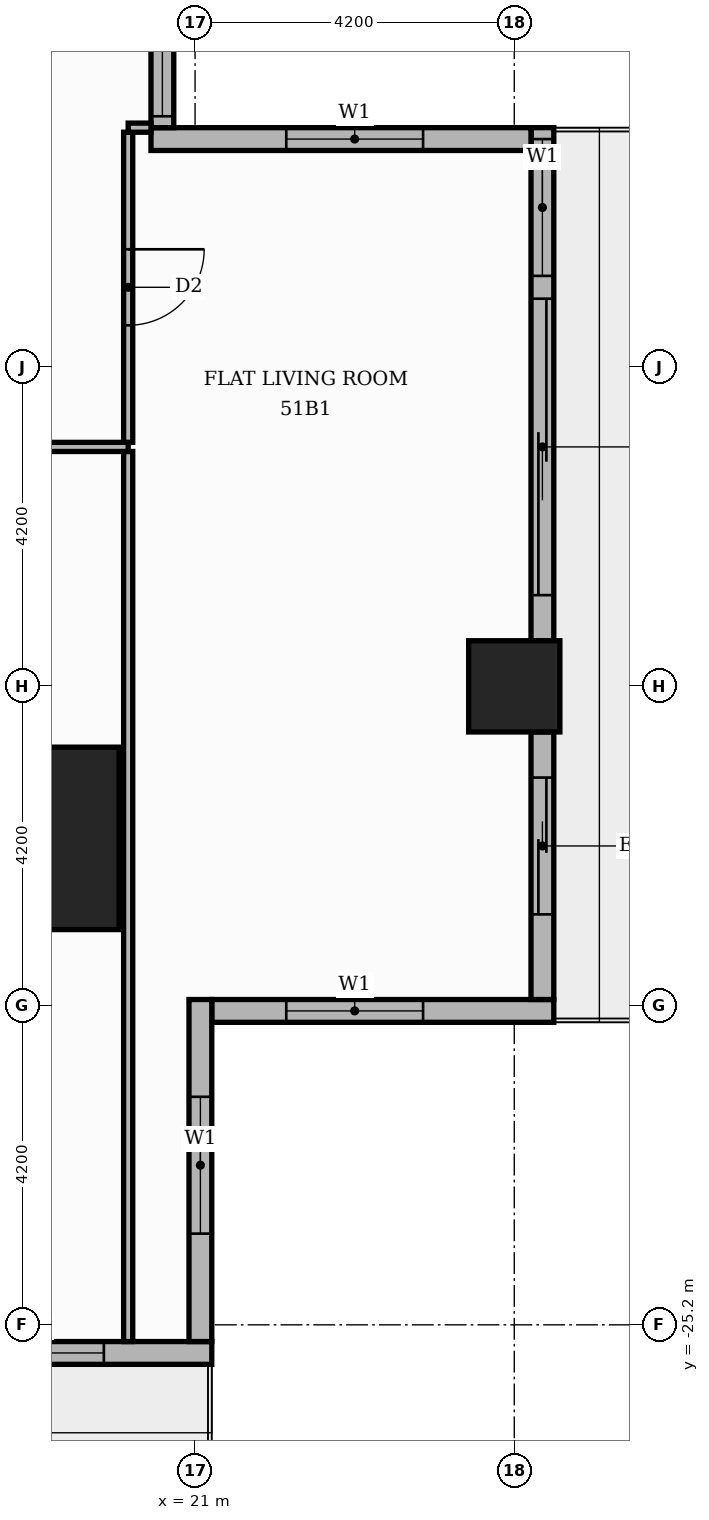
"""IFC4 building model, lengths in metres.
Left out: names, types, materials, properties, quantities, classifications, styles, units other than length and angle.
Written with IfcOpenShell. Run it as: python <this file> out.ifc"""

import sys

from ifc_helpers import new_model, si_unit, direction, frame, frame_2d, origin, origin_2d, place, context, subcontext, project, spatial, rectangle, extrude, element, fill, save


model = new_model("IFC4")
c1 = context("Model", 3, precision=1e-05, world=origin(), true_north=direction((0.0, 1.0)))
c2 = subcontext(c1, "Body", "Model", "MODEL_VIEW")
j1 = project(units=[si_unit("LENGTHUNIT", "METRE"), si_unit("PLANEANGLEUNIT", "RADIAN")], contexts=[c1])
p1 = place(None, origin())
s1 = spatial("IfcSite", under=j1, at=p1, CompositionType="ELEMENT")
p2 = place(p1, origin())
s2 = spatial("IfcBuilding", under=s1, at=p2, CompositionType="ELEMENT")
p3 = place(p2, frame((0.0, 0.0, 215.7)))
s3 = spatial("IfcBuildingStorey", under=s2, at=p3, CompositionType="ELEMENT", Elevation=215.7)
p4 = place(p3, frame((18.8, -18.8, 0.0), z_axis=(0.0, 0.0, 1.0), x_axis=(1.0, 0.0, 0.0)))
e1 = element("IfcColumn", 1, at=p4, inside=s3, PredefinedType="COLUMN", context=c2, shape_type="SweptSolid", body=[
    extrude(rectangle(XDim=2.4, YDim=2.4, at=origin_2d()), origin(), (0.0, 0.0, 1.0), 3.9),
])
p5 = place(p3, frame((25.2, -16.8, 0.0), z_axis=(0.0, 0.0, 1.0), x_axis=(1.0, 0.0, 0.0)))
e2 = element("IfcColumn", 2, at=p5, inside=s3, PredefinedType="COLUMN", context=c2, shape_type="SweptSolid", body=[
    extrude(rectangle(XDim=1.2, YDim=1.2, at=origin_2d()), origin(), (0.0, 0.0, 1.0), 3.9),
])
p6 = place(p3, frame((21.22, -21.07, 0.0), z_axis=(0.0, 0.0, 1.0), x_axis=(1.0, 0.0, 0.0)))
e3 = element("IfcWall", 3, at=p6, inside=s3, PredefinedType="STANDARD", context=c2, shape_type="SweptSolid", body=[
    extrude(rectangle(XDim=4.5, YDim=0.3, at=frame_2d((2.25, 0.0))), origin(), (0.0, 0.0, 1.0), 3.48),
])
p7 = place(p6, frame((0.98, 0.0, 0.9)))
e4 = element("IfcOpeningElement", 4, at=p7, cuts=e3, PredefinedType="OPENING", context=c2, shape_type="SweptSolid", body=[
    extrude(rectangle(XDim=1.8, YDim=2.1, at=frame_2d((0.9, 1.05))), frame((0.0, 0.16, 0.0), z_axis=(0.0, -1.0, 0.0), x_axis=(1.0, 0.0, 0.0)), (0.0, 0.0, 1.0), 0.32),
])
p8 = place(p3, frame((25.57, -20.92, 0.0), z_axis=(0.0, 0.0, 1.0), x_axis=(0.0, 1.0, 0.0)))
e5 = element("IfcWall", 5, at=p8, inside=s3, PredefinedType="STANDARD", context=c2, shape_type="SweptSolid", body=[
    extrude(rectangle(XDim=3.52, YDim=0.3, at=frame_2d((1.76, 0.0))), origin(), (0.0, 0.0, 1.0), 3.48),
])
p9 = place(p8, frame((1.12, 0.0, 0.0)))
e6 = element("IfcOpeningElement", 6, at=p9, cuts=e5, PredefinedType="OPENING", context=c2, shape_type="SweptSolid", body=[
    extrude(rectangle(XDim=1.8, YDim=2.4, at=frame_2d((0.9, 1.2))), frame((0.0, 0.16, 0.0), z_axis=(0.0, -1.0, 0.0), x_axis=(1.0, 0.0, 0.0)), (0.0, 0.0, 1.0), 0.32),
])
p10 = place(p3, frame((25.57, -16.2, 0.0), z_axis=(0.0, 0.0, 1.0), x_axis=(0.0, 1.0, 0.0)))
e7 = element("IfcWall", 7, at=p10, inside=s3, PredefinedType="STANDARD", context=c2, shape_type="SweptSolid", body=[
    extrude(rectangle(XDim=6.75, YDim=0.3, at=frame_2d((3.375, 0.0))), origin(), (0.0, 0.0, 1.0), 3.48),
])
p11 = place(p10, frame((0.6, 0.0, 0.0)))
e8 = element("IfcOpeningElement", 8, at=p11, cuts=e7, PredefinedType="OPENING", context=c2, shape_type="SweptSolid", body=[
    extrude(rectangle(XDim=3.9, YDim=2.4, at=frame_2d((1.95, 1.2))), frame((0.0, 0.16, 0.0), z_axis=(0.0, -1.0, 0.0), x_axis=(1.0, 0.0, 0.0)), (0.0, 0.0, 1.0), 0.32),
])
p12 = place(p10, frame((4.8, 0.0, 0.9)))
e9 = element("IfcOpeningElement", 9, at=p12, cuts=e7, PredefinedType="OPENING", context=c2, shape_type="SweptSolid", body=[
    extrude(rectangle(XDim=1.8, YDim=2.1, at=frame_2d((0.9, 1.05))), frame((0.0, 0.16, 0.0), z_axis=(0.0, -1.0, 0.0), x_axis=(1.0, 0.0, 0.0)), (0.0, 0.0, 1.0), 0.32),
])
p13 = place(p3, frame((25.42, -9.6, 0.0), z_axis=(0.0, 0.0, 1.0), x_axis=(-1.0, 0.0, 0.0)))
e10 = element("IfcWall", 10, at=p13, inside=s3, PredefinedType="STANDARD", context=c2, shape_type="SweptSolid", body=[
    extrude(rectangle(XDim=5.0, YDim=0.3, at=frame_2d((2.5, 0.0))), origin(), (0.0, 0.0, 1.0), 3.48),
])
p14 = place(p13, frame((1.42, 0.0, 0.9)))
e11 = element("IfcOpeningElement", 11, at=p14, cuts=e10, PredefinedType="OPENING", context=c2, shape_type="SweptSolid", body=[
    extrude(rectangle(XDim=1.8, YDim=2.1, at=frame_2d((0.9, 1.05))), frame((0.0, 0.16, 0.0), z_axis=(0.0, -1.0, 0.0), x_axis=(1.0, 0.0, 0.0)), (0.0, 0.0, 1.0), 0.32),
])
p15 = place(p3, frame((20.57, -9.45, 0.0), z_axis=(0.0, 0.0, 1.0), x_axis=(0.0, 1.0, 0.0)))
e12 = element("IfcWall", 12, at=p15, inside=s3, PredefinedType="STANDARD", context=c2, shape_type="SweptSolid", body=[
    extrude(rectangle(XDim=19.2, YDim=0.3, at=frame_2d((9.6, 0.0))), origin(), (0.0, 0.0, 1.0), 3.48),
])
p16 = place(p15, frame((0.15, 0.0, 0.9)))
e13 = element("IfcOpeningElement", 13, at=p16, cuts=e12, PredefinedType="OPENING", context=c2, shape_type="SweptSolid", body=[
    extrude(rectangle(XDim=6.0, YDim=2.1, at=frame_2d((3.0, 1.05))), frame((0.0, 0.16, 0.0), z_axis=(0.0, -1.0, 0.0), x_axis=(1.0, 0.0, 0.0)), (0.0, 0.0, 1.0), 0.32),
])
p17 = place(p15, frame((6.45, 0.0, 0.9)))
e14 = element("IfcOpeningElement", 14, at=p17, cuts=e12, PredefinedType="OPENING", context=c2, shape_type="SweptSolid", body=[
    extrude(rectangle(XDim=6.0, YDim=2.1, at=frame_2d((3.0, 1.05))), frame((0.0, 0.16, 0.0), z_axis=(0.0, -1.0, 0.0), x_axis=(1.0, 0.0, 0.0)), (0.0, 0.0, 1.0), 0.32),
])
p18 = place(p15, frame((12.75, 0.0, 0.9)))
e15 = element("IfcOpeningElement", 15, at=p18, cuts=e12, PredefinedType="OPENING", context=c2, shape_type="SweptSolid", body=[
    extrude(rectangle(XDim=6.0, YDim=2.1, at=frame_2d((3.0, 1.05))), frame((0.0, 0.16, 0.0), z_axis=(0.0, -1.0, 0.0), x_axis=(1.0, 0.0, 0.0)), (0.0, 0.0, 1.0), 0.32),
])
p19 = place(p3, frame((17.4, -25.57, 0.0), z_axis=(0.0, 0.0, 1.0), x_axis=(1.0, 0.0, 0.0)))
e16 = element("IfcWall", 16, at=p19, inside=s3, PredefinedType="STANDARD", context=c2, shape_type="SweptSolid", body=[
    extrude(rectangle(XDim=3.82, YDim=0.3, at=frame_2d((1.91, 0.0))), origin(), (0.0, 0.0, 1.0), 3.48),
])
p20 = place(p19, frame((0.6, 0.0, 0.9)))
e17 = element("IfcOpeningElement", 17, at=p20, cuts=e16, PredefinedType="OPENING", context=c2, shape_type="SweptSolid", body=[
    extrude(rectangle(XDim=1.8, YDim=2.1, at=frame_2d((0.9, 1.05))), frame((0.0, 0.16, 0.0), z_axis=(0.0, -1.0, 0.0), x_axis=(1.0, 0.0, 0.0)), (0.0, 0.0, 1.0), 0.32),
])
p21 = place(p3, frame((21.07, -25.42, 0.0), z_axis=(0.0, 0.0, 1.0), x_axis=(0.0, 1.0, 0.0)))
e18 = element("IfcWall", 18, at=p21, inside=s3, PredefinedType="STANDARD", context=c2, shape_type="SweptSolid", body=[
    extrude(rectangle(XDim=4.5, YDim=0.3, at=frame_2d((2.25, 0.0))), origin(), (0.0, 0.0, 1.0), 3.48),
])
p22 = place(p21, frame((1.42, 0.0, 0.9)))
e19 = element("IfcOpeningElement", 19, at=p22, cuts=e18, PredefinedType="OPENING", context=c2, shape_type="SweptSolid", body=[
    extrude(rectangle(XDim=1.8, YDim=2.1, at=frame_2d((0.9, 1.05))), frame((0.0, 0.16, 0.0), z_axis=(0.0, -1.0, 0.0), x_axis=(1.0, 0.0, 0.0)), (0.0, 0.0, 1.0), 0.32),
])
p23 = place(p3, frame((20.12, -25.42, 0.0), z_axis=(0.0, 0.0, 1.0), x_axis=(0.0, 1.0, 0.0)))
e20 = element("IfcWall", 20, at=p23, inside=s3, PredefinedType="PARTITIONING", context=c2, shape_type="SweptSolid", body=[
    extrude(rectangle(XDim=11.71, YDim=0.12, at=frame_2d((5.855, 0.0))), origin(), (0.0, 0.0, 1.0), 3.48),
])
p24 = place(p3, frame((13.65, -13.65, 0.0), z_axis=(0.0, 0.0, 1.0), x_axis=(1.0, 0.0, 0.0)))
e21 = element("IfcWall", 21, at=p24, inside=s3, PredefinedType="PARTITIONING", context=c2, shape_type="SweptSolid", body=[
    extrude(rectangle(XDim=6.47, YDim=0.12, at=frame_2d((3.235, 0.0))), origin(), (0.0, 0.0, 1.0), 3.48),
])
p25 = place(p24, frame((2.785, 0.0, 0.0)))
e22 = element("IfcOpeningElement", 22, at=p25, cuts=e21, PredefinedType="OPENING", context=c2, shape_type="SweptSolid", body=[
    extrude(rectangle(XDim=0.9, YDim=2.1, at=frame_2d((0.45, 1.05))), frame((0.0, 0.07, 0.0), z_axis=(0.0, -1.0, 0.0), x_axis=(1.0, 0.0, 0.0)), (0.0, 0.0, 1.0), 0.14),
])
p26 = place(p3, frame((20.12, -13.59, 0.0), z_axis=(0.0, 0.0, 1.0), x_axis=(0.0, 1.0, 0.0)))
e23 = element("IfcWall", 23, at=p26, inside=s3, PredefinedType="PARTITIONING", context=c2, shape_type="SweptSolid", body=[
    extrude(rectangle(XDim=4.08, YDim=0.12, at=frame_2d((2.04, 0.0))), origin(), (0.0, 0.0, 1.0), 3.48),
])
p27 = place(p26, frame((1.54, 0.0, 0.0)))
e24 = element("IfcOpeningElement", 24, at=p27, cuts=e23, PredefinedType="OPENING", context=c2, shape_type="SweptSolid", body=[
    extrude(rectangle(XDim=1.0, YDim=2.1, at=frame_2d((0.5, 1.05))), frame((0.0, 0.07, 0.0), z_axis=(0.0, -1.0, 0.0), x_axis=(1.0, 0.0, 0.0)), (0.0, 0.0, 1.0), 0.14),
])
p28 = place(p3, frame((20.12, -9.45, 0.0), z_axis=(0.0, 0.0, 1.0), x_axis=(1.0, 0.0, 0.0)))
e25 = element("IfcWall", 25, at=p28, inside=s3, PredefinedType="PARTITIONING", context=c2, shape_type="SweptSolid", body=[
    extrude(rectangle(XDim=0.3, YDim=0.12, at=frame_2d((0.15, 0.0))), origin(), (0.0, 0.0, 1.0), 3.48),
])
p29 = place(p7, origin())
e26 = element("IfcWindow", 26, at=p29, inside=s3, PartitioningType="SINGLE_PANEL", PredefinedType="WINDOW", context=c2, shape_type="SweptSolid", body=[
    extrude(rectangle(XDim=1.8, YDim=2.1, at=frame_2d((0.9, 1.05))), frame((0.0, 0.03, 0.0), z_axis=(0.0, -1.0, 0.0), x_axis=(1.0, 0.0, 0.0)), (0.0, 0.0, 1.0), 0.06),
])
fill(e4, e26)
p30 = place(p9, origin())
e27 = element("IfcDoor", 27, at=p30, inside=s3, OperationType="SLIDING_TO_RIGHT", PredefinedType="DOOR", context=c2, shape_type="SweptSolid", body=[
    extrude(rectangle(XDim=1.8, YDim=2.4, at=frame_2d((0.9, 1.2))), frame((0.0, 0.025, 0.0), z_axis=(0.0, -1.0, 0.0), x_axis=(1.0, 0.0, 0.0)), (0.0, 0.0, 1.0), 0.05),
])
fill(e6, e27)
p31 = place(p11, origin())
e28 = element("IfcDoor", 28, at=p31, inside=s3, OperationType="SLIDING_TO_LEFT", PredefinedType="DOOR", context=c2, shape_type="SweptSolid", body=[
    extrude(rectangle(XDim=3.9, YDim=2.4, at=frame_2d((1.95, 1.2))), frame((0.0, 0.025, 0.0), z_axis=(0.0, -1.0, 0.0), x_axis=(1.0, 0.0, 0.0)), (0.0, 0.0, 1.0), 0.05),
])
fill(e8, e28)
p32 = place(p12, origin())
e29 = element("IfcWindow", 29, at=p32, inside=s3, PartitioningType="SINGLE_PANEL", PredefinedType="WINDOW", context=c2, shape_type="SweptSolid", body=[
    extrude(rectangle(XDim=1.8, YDim=2.1, at=frame_2d((0.9, 1.05))), frame((0.0, 0.03, 0.0), z_axis=(0.0, -1.0, 0.0), x_axis=(1.0, 0.0, 0.0)), (0.0, 0.0, 1.0), 0.06),
])
fill(e9, e29)
p33 = place(p14, origin())
e30 = element("IfcWindow", 30, at=p33, inside=s3, PartitioningType="SINGLE_PANEL", PredefinedType="WINDOW", context=c2, shape_type="SweptSolid", body=[
    extrude(rectangle(XDim=1.8, YDim=2.1, at=frame_2d((0.9, 1.05))), frame((0.0, 0.03, 0.0), z_axis=(0.0, -1.0, 0.0), x_axis=(1.0, 0.0, 0.0)), (0.0, 0.0, 1.0), 0.06),
])
fill(e11, e30)
p34 = place(p16, origin())
e31 = element("IfcWindow", 31, at=p34, inside=s3, PartitioningType="SINGLE_PANEL", PredefinedType="WINDOW", context=c2, shape_type="SweptSolid", body=[
    extrude(rectangle(XDim=6.0, YDim=2.1, at=frame_2d((3.0, 1.05))), frame((0.0, 0.03, 0.0), z_axis=(0.0, -1.0, 0.0), x_axis=(1.0, 0.0, 0.0)), (0.0, 0.0, 1.0), 0.06),
])
fill(e13, e31)
p35 = place(p20, origin())
e32 = element("IfcWindow", 32, at=p35, inside=s3, PartitioningType="SINGLE_PANEL", PredefinedType="WINDOW", context=c2, shape_type="SweptSolid", body=[
    extrude(rectangle(XDim=1.8, YDim=2.1, at=frame_2d((0.9, 1.05))), frame((0.0, 0.03, 0.0), z_axis=(0.0, -1.0, 0.0), x_axis=(1.0, 0.0, 0.0)), (0.0, 0.0, 1.0), 0.06),
])
fill(e17, e32)
p36 = place(p22, origin())
e33 = element("IfcWindow", 33, at=p36, inside=s3, PartitioningType="SINGLE_PANEL", PredefinedType="WINDOW", context=c2, shape_type="SweptSolid", body=[
    extrude(rectangle(XDim=1.8, YDim=2.1, at=frame_2d((0.9, 1.05))), frame((0.0, 0.03, 0.0), z_axis=(0.0, -1.0, 0.0), x_axis=(1.0, 0.0, 0.0)), (0.0, 0.0, 1.0), 0.06),
])
fill(e19, e33)
p37 = place(p27, frame((1.0, 0.0, 0.0), z_axis=(0.0, 0.0, 1.0), x_axis=(-1.0, 0.0, 0.0)))
e34 = element("IfcDoor", 34, at=p37, inside=s3, OperationType="SINGLE_SWING_RIGHT", PredefinedType="DOOR", context=c2, shape_type="SweptSolid", body=[
    extrude(rectangle(XDim=1.0, YDim=2.1, at=frame_2d((0.5, 1.05))), frame((0.0, 0.025, 0.0), z_axis=(0.0, -1.0, 0.0), x_axis=(1.0, 0.0, 0.0)), (0.0, 0.0, 1.0), 0.05),
])
fill(e24, e34)
save(model, sys.argv[1])
